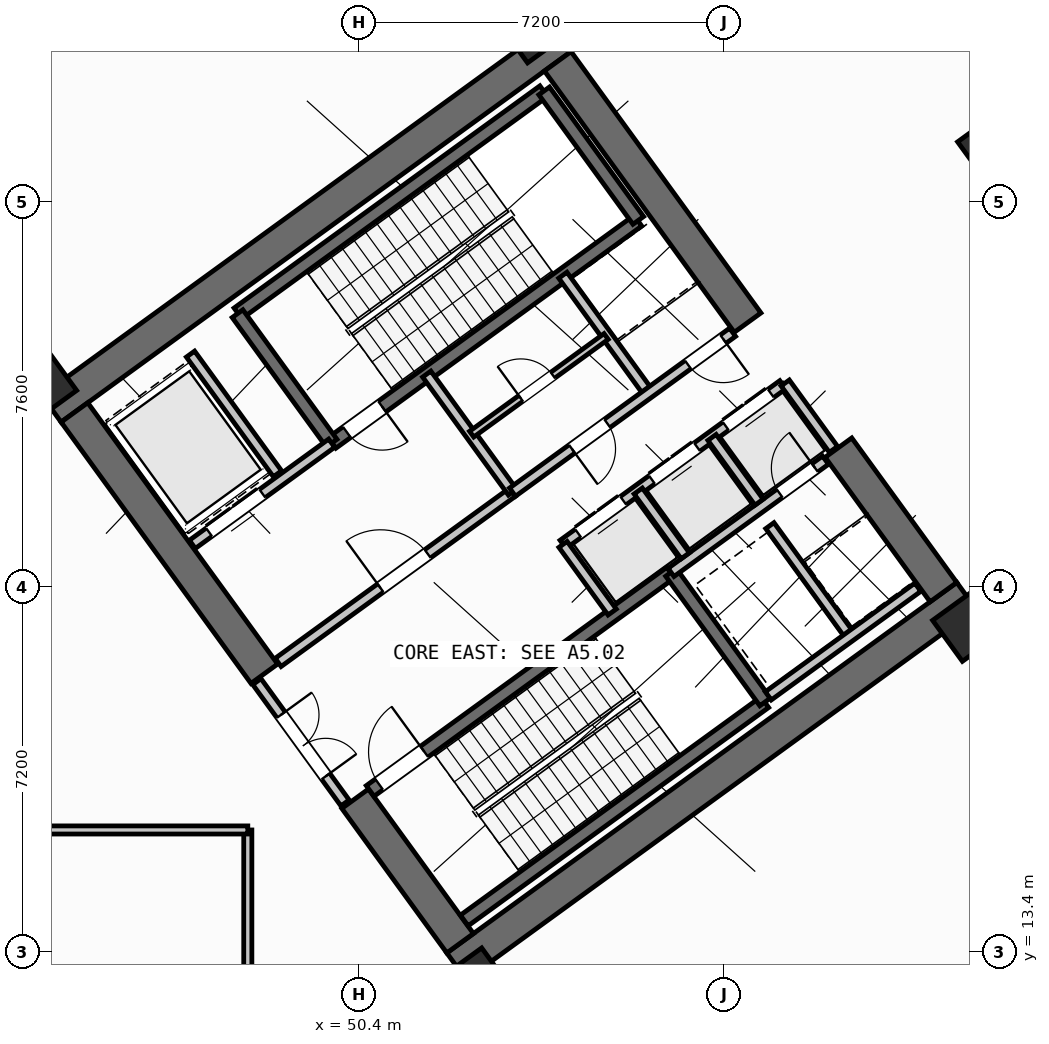
"""IFC4 building model, lengths in metres.
Left out: names, types, materials, properties, quantities, classifications, styles, units other than length and angle.
Written with IfcOpenShell. Run it as: python <this file> out.ifc"""

import sys

from ifc_helpers import new_model, si_unit, direction, frame, frame_2d, origin, origin_2d, place, context, subcontext, project, spatial, rectangle, hollow_rectangle, extrude, source, transform, mapped, element, fill, save


model = new_model("IFC4")
c1 = context("Model", 3, precision=1e-05, world=origin(), true_north=direction((0.0, 1.0)))
c2 = subcontext(c1, "Body", "Model", "MODEL_VIEW")
j1 = project(units=[si_unit("LENGTHUNIT", "METRE"), si_unit("PLANEANGLEUNIT", "RADIAN")], contexts=[c1])
p1 = place(None, origin())
s1 = spatial("IfcSite", under=j1, at=p1, CompositionType="ELEMENT")
p2 = place(p1, origin())
s2 = spatial("IfcBuilding", under=s1, at=p2, CompositionType="ELEMENT")
p3 = place(p2, frame((0.0, 0.0, 18.6)))
s3 = spatial("IfcBuildingStorey", under=s2, at=p3, CompositionType="ELEMENT", Elevation=18.6)
p4 = place(p3, frame((52.318, 13.11, 0.0), z_axis=(0.0, 0.0, 1.0), x_axis=(0.809019445368, 0.587781878776, 0.0)))
e1 = element("IfcWall", 1, at=p4, inside=s3, PredefinedType="SHEAR", context=c2, shape_type="SweptSolid", body=[
    extrude(rectangle(XDim=12.44, YDim=0.65, at=frame_2d((6.22, 0.0))), origin(), (0.0, 0.0, 1.0), 4.95),
])
p5 = place(p3, frame((44.325, 24.113, 0.0), z_axis=(0.0, 0.0, 1.0), x_axis=(0.809012664862, 0.58779121131, 0.0)))
e2 = element("IfcWall", 2, at=p5, inside=s3, PredefinedType="SHEAR", context=c2, shape_type="SweptSolid", body=[
    extrude(rectangle(XDim=12.44, YDim=0.65, at=frame_2d((6.22, 0.0))), origin(), (0.0, 0.0, 1.0), 4.95),
])
p6 = place(p3, frame((52.39, 13.564, 0.0), z_axis=(0.0, 0.0, 1.0), x_axis=(-0.58779688989, 0.809008539037, 0.0)))
e3 = element("IfcWall", 3, at=p6, inside=s3, PredefinedType="SHEAR", context=c2, shape_type="SweptSolid", body=[
    extrude(rectangle(XDim=3.525, YDim=0.65, at=frame_2d((1.763, 0.0))), origin(), (0.0, 0.0, 1.0), 4.95),
])
p7 = place(p3, frame((48.526, 18.884, 0.0), z_axis=(0.0, 0.0, 1.0), x_axis=(-0.58777996584, 0.809020835181, 0.0)))
e4 = element("IfcWall", 4, at=p7, inside=s3, PredefinedType="SHEAR", context=c2, shape_type="SweptSolid", body=[
    extrude(rectangle(XDim=6.375, YDim=0.65, at=frame_2d((3.188, 0.0))), origin(), (0.0, 0.0, 1.0), 4.95),
])
p8 = place(p3, frame((61.929, 20.494, 0.0), z_axis=(0.0, 0.0, 1.0), x_axis=(-0.58782982593, 0.808984607855, 0.0)))
e5 = element("IfcWall", 5, at=p8, inside=s3, PredefinedType="SHEAR", context=c2, shape_type="SweptSolid", body=[
    extrude(rectangle(XDim=3.525, YDim=0.65, at=frame_2d((1.762, 0.0))), origin(), (0.0, 0.0, 1.0), 4.95),
])
p9 = place(p3, frame((58.064, 25.813, 0.0), z_axis=(0.0, 0.0, 1.0), x_axis=(-0.58777996584, 0.809020835181, 0.0)))
e6 = element("IfcWall", 6, at=p9, inside=s3, PredefinedType="SHEAR", context=c2, shape_type="SweptSolid", body=[
    extrude(rectangle(XDim=6.375, YDim=0.65, at=frame_2d((3.188, 0.0))), origin(), (0.0, 0.0, 1.0), 4.95),
])
m1 = source(origin(), c2, "Body", "SweptSolid", [
    extrude(hollow_rectangle(XDim=1.1, YDim=1.1, WallThickness=0.04, at=origin_2d()), origin(), (0.0, 0.0, 1.0), 5.4),
])
p10 = place(p3, frame((62.977, 29.259, 0.0), z_axis=(0.0, 0.0, 1.0), x_axis=(0.809016994375, 0.587785252292, 0.0)))
e7 = element("IfcColumn", 7, at=p10, inside=s3, PredefinedType="COLUMN", context=c2, shape_type="MappedRepresentation", body=[
    mapped(m1, transform((0.0, 0.0, 0.0), scale=1.0)),
])
m2 = source(origin(), c2, "Body", "SweptSolid", [
    extrude(hollow_rectangle(XDim=1.0, YDim=1.0, WallThickness=0.04, at=origin_2d()), origin(), (0.0, 0.0, 1.0), 5.4),
])
for number, where, z_axis, x_axis in (
    (8, (52.705, 12.773, 0.0), (0.0, 0.0, 1.0), (0.809, 0.588, 0.0)),
    (9, (44.124, 24.585, 0.0), (0.0, 0.0, 1.0), (0.809, 0.588, 0.0)),
    (10, (62.414, 19.827, 0.0), (0.0, 0.0, 1.0), (0.809, 0.588, 0.0)),
    (11, (53.832, 31.638, 0.0), (0.0, 0.0, 1.0), (0.809, 0.588, 0.0)),
):
    element("IfcColumn", number, at=place(p3, frame(where, z_axis=z_axis, x_axis=x_axis)), inside=s3, PredefinedType="COLUMN", context=c2, shape_type="MappedRepresentation", body=[
        mapped(m2, transform((0.0, 0.0, 0.0), scale=1.0)),
    ])
p11 = place(p3, frame((48.006, 25.996, 0.0), z_axis=(0.0, 0.0, 1.0), x_axis=(0.80901903764, 0.587782439969, 0.0)))
e12 = element("IfcWall", 12, at=p11, inside=s3, PredefinedType="SHEAR", context=c2, shape_type="SweptSolid", body=[
    extrude(rectangle(XDim=7.46, YDim=0.26, at=frame_2d((3.73, 0.0))), origin(), (0.0, 0.0, 1.0), 4.95),
])
p12 = place(p3, frame((49.863, 23.44, 0.0), z_axis=(0.0, 0.0, 1.0), x_axis=(0.809003474932, 0.587803859759, 0.0)))
e13 = element("IfcWall", 13, at=p12, inside=s3, PredefinedType="SHEAR", context=c2, shape_type="SweptSolid", body=[
    extrude(rectangle(XDim=7.46, YDim=0.26, at=frame_2d((3.73, 0.0))), origin(), (0.0, 0.0, 1.0), 4.95),
])
p13 = place(p12, frame((0.36, 0.0, 0.0)))
e14 = element("IfcOpeningElement", 14, at=p13, cuts=e13, PredefinedType="OPENING", context=c2, shape_type="SweptSolid", body=[
    extrude(rectangle(XDim=0.86, YDim=2.05, at=frame_2d((0.43, 1.025))), frame((0.0, 0.14, 0.0), z_axis=(0.0, -1.0, 0.0), x_axis=(1.0, 0.0, 0.0)), (0.0, 0.0, 1.0), 0.28),
])
p14 = place(p3, frame((49.855, 23.434, 0.0), z_axis=(0.0, 0.0, 1.0), x_axis=(-0.58776738483, 0.809029975545, 0.0)))
e15 = element("IfcWall", 15, at=p14, inside=s3, PredefinedType="SHEAR", context=c2, shape_type="SweptSolid", body=[
    extrude(rectangle(XDim=3.16, YDim=0.26, at=frame_2d((1.58, 0.0))), origin(), (0.0, 0.0, 1.0), 4.95),
])
p15 = place(p3, frame((55.906, 27.831, 0.0), z_axis=(0.0, 0.0, 1.0), x_axis=(-0.587804123638, 0.809003283204, 0.0)))
e16 = element("IfcWall", 16, at=p15, inside=s3, PredefinedType="SHEAR", context=c2, shape_type="SweptSolid", body=[
    extrude(rectangle(XDim=3.16, YDim=0.26, at=frame_2d((1.58, 0.0))), origin(), (0.0, 0.0, 1.0), 4.95),
])
p16 = place(p3, frame((52.472, 14.013, 0.0), z_axis=(0.0, 0.0, 1.0), x_axis=(0.809028366311, 0.587769599847, 0.0)))
e17 = element("IfcWall", 17, at=p16, inside=s3, PredefinedType="SHEAR", context=c2, shape_type="SweptSolid", body=[
    extrude(rectangle(XDim=7.33, YDim=0.26, at=frame_2d((3.665, 0.0))), origin(), (0.0, 0.0, 1.0), 4.95),
])
p17 = place(p3, frame((50.615, 16.57, 0.0), z_axis=(0.0, 0.0, 1.0), x_axis=(0.809028366311, 0.587769599847, 0.0)))
e18 = element("IfcWall", 18, at=p17, inside=s3, PredefinedType="SHEAR", context=c2, shape_type="SweptSolid", body=[
    extrude(rectangle(XDim=7.33, YDim=0.26, at=frame_2d((3.665, 0.0))), origin(), (0.0, 0.0, 1.0), 4.95),
])
p18 = place(p17, frame((0.22, 0.0, 0.0)))
e19 = element("IfcOpeningElement", 19, at=p18, cuts=e18, PredefinedType="OPENING", context=c2, shape_type="SweptSolid", body=[
    extrude(rectangle(XDim=1.1, YDim=2.1, at=frame_2d((0.55, 1.05))), frame((0.0, 0.14, 0.0), z_axis=(0.0, -1.0, 0.0), x_axis=(1.0, 0.0, 0.0)), (0.0, 0.0, 1.0), 0.28),
])
p19 = place(p3, frame((58.41, 18.327, 0.0), z_axis=(0.0, 0.0, 1.0), x_axis=(-0.58776738483, 0.809029975545, 0.0)))
e20 = element("IfcWall", 20, at=p19, inside=s3, PredefinedType="SHEAR", context=c2, shape_type="SweptSolid", body=[
    extrude(rectangle(XDim=3.16, YDim=0.26, at=frame_2d((1.58, 0.0))), origin(), (0.0, 0.0, 1.0), 4.95),
])
p20 = place(p3, frame((47.106, 21.437, 0.0), z_axis=(0.0, 0.0, 1.0), x_axis=(0.809012514015, 0.58779141893, 0.0)))
e21 = element("IfcWall", 21, at=p20, inside=s3, PredefinedType="STANDARD", context=c2, shape_type="SweptSolid", body=[
    extrude(rectangle(XDim=3.398, YDim=0.2, at=frame_2d((1.699, 0.0))), origin(), (0.0, 0.0, 1.0), 4.94),
])
p21 = place(p20, frame((0.408, 0.0, 0.0)))
e22 = element("IfcOpeningElement", 22, at=p21, cuts=e21, PredefinedType="OPENING", context=c2, shape_type="SweptSolid", body=[
    extrude(rectangle(XDim=1.3, YDim=2.2, at=frame_2d((0.65, 1.1))), frame((0.0, 0.11, 0.0), z_axis=(0.0, -1.0, 0.0), x_axis=(1.0, 0.0, 0.0)), (0.0, 0.0, 1.0), 0.22),
])
p22 = place(p3, frame((48.799, 19.107, 0.0), z_axis=(0.0, 0.0, 1.0), x_axis=(0.809012959416, 0.587790805897, 0.0)))
e23 = element("IfcWall", 23, at=p22, inside=s3, PredefinedType="STANDARD", context=c2, shape_type="SweptSolid", body=[
    extrude(rectangle(XDim=5.718, YDim=0.2, at=frame_2d((2.859, 0.0))), origin(), (0.0, 0.0, 1.0), 4.94),
])
p23 = place(p22, frame((2.498, 0.0, 0.0)))
e24 = element("IfcOpeningElement", 24, at=p23, cuts=e23, PredefinedType="OPENING", context=c2, shape_type="SweptSolid", body=[
    extrude(rectangle(XDim=1.15, YDim=2.1, at=frame_2d((0.575, 1.05))), frame((0.0, 0.11, 0.0), z_axis=(0.0, -1.0, 0.0), x_axis=(1.0, 0.0, 0.0)), (0.0, 0.0, 1.0), 0.22),
])
p24 = place(p3, frame((56.553, 20.884, 0.0), z_axis=(0.0, 0.0, 1.0), x_axis=(0.809035789462, 0.587759382205, 0.0)))
e25 = element("IfcWall", 25, at=p24, inside=s3, PredefinedType="STANDARD", context=c2, shape_type="SweptSolid", body=[
    extrude(rectangle(XDim=3.768, YDim=0.2, at=frame_2d((1.884, 0.0))), origin(), (0.0, 0.0, 1.0), 4.94),
])
p25 = place(p24, frame((2.65, 0.0, 0.0)))
e26 = element("IfcOpeningElement", 26, at=p25, cuts=e25, PredefinedType="OPENING", context=c2, shape_type="SweptSolid", body=[
    extrude(rectangle(XDim=0.86, YDim=2.05, at=frame_2d((0.43, 1.025))), frame((0.0, 0.11, 0.0), z_axis=(0.0, -1.0, 0.0), x_axis=(1.0, 0.0, 0.0)), (0.0, 0.0, 1.0), 0.22),
])
p26 = place(p3, frame((54.421, 21.436, 0.0), z_axis=(0.0, 0.0, 1.0), x_axis=(0.809013710463, 0.587789772183, 0.0)))
e27 = element("IfcWall", 27, at=p26, inside=s3, PredefinedType="STANDARD", context=c2, shape_type="SweptSolid", body=[
    extrude(rectangle(XDim=5.36, YDim=0.2, at=frame_2d((2.68, 0.0))), origin(), (0.0, 0.0, 1.0), 4.94),
])
p27 = place(p26, frame((0.37, 0.0, 0.0)))
e28 = element("IfcOpeningElement", 28, at=p27, cuts=e27, PredefinedType="OPENING", context=c2, shape_type="SweptSolid", body=[
    extrude(rectangle(XDim=1.1, YDim=2.15, at=frame_2d((0.55, 1.075))), frame((0.0, 0.11, 0.0), z_axis=(0.0, -1.0, 0.0), x_axis=(1.0, 0.0, 0.0)), (0.0, 0.0, 1.0), 0.22),
])
p28 = place(p26, frame((2.17, 0.0, 0.0)))
e29 = element("IfcOpeningElement", 29, at=p28, cuts=e27, PredefinedType="OPENING", context=c2, shape_type="SweptSolid", body=[
    extrude(rectangle(XDim=1.1, YDim=2.15, at=frame_2d((0.55, 1.075))), frame((0.0, 0.11, 0.0), z_axis=(0.0, -1.0, 0.0), x_axis=(1.0, 0.0, 0.0)), (0.0, 0.0, 1.0), 0.22),
])
p29 = place(p26, frame((3.97, 0.0, 0.0)))
e30 = element("IfcOpeningElement", 30, at=p29, cuts=e27, PredefinedType="OPENING", context=c2, shape_type="SweptSolid", body=[
    extrude(rectangle(XDim=1.1, YDim=2.15, at=frame_2d((0.55, 1.075))), frame((0.0, 0.11, 0.0), z_axis=(0.0, -1.0, 0.0), x_axis=(1.0, 0.0, 0.0)), (0.0, 0.0, 1.0), 0.22),
])
p30 = place(p3, frame((55.391, 20.102, 0.0), z_axis=(0.0, 0.0, 1.0), x_axis=(-0.58778447739, 0.809017557374, 0.0)))
e31 = element("IfcWall", 31, at=p30, inside=s3, PredefinedType="STANDARD", context=c2, shape_type="SweptSolid", body=[
    extrude(rectangle(XDim=1.65, YDim=0.2, at=frame_2d((0.825, 0.0))), origin(), (0.0, 0.0, 1.0), 4.94),
])
p31 = place(p3, frame((48.786, 22.83, 0.0), z_axis=(0.0, 0.0, 1.0), x_axis=(-0.587783856777, 0.809018008275, 0.0)))
e32 = element("IfcWall", 32, at=p31, inside=s3, PredefinedType="STANDARD", context=c2, shape_type="SweptSolid", body=[
    extrude(rectangle(XDim=2.92, YDim=0.2, at=frame_2d((1.46, 0.0))), origin(), (0.0, 0.0, 1.0), 4.94),
])
p32 = place(p3, frame((56.834, 21.212, 0.0), z_axis=(0.0, 0.0, 1.0), x_axis=(-0.58776738483, 0.809029975545, 0.0)))
e33 = element("IfcWall", 33, at=p32, inside=s3, PredefinedType="STANDARD", context=c2, shape_type="SweptSolid", body=[
    extrude(rectangle(XDim=1.58, YDim=0.2, at=frame_2d((0.79, 0.0))), origin(), (0.0, 0.0, 1.0), 4.94),
])
p33 = place(p3, frame((58.29, 22.27, 0.0), z_axis=(0.0, 0.0, 1.0), x_axis=(-0.587840865826, 0.808976585857, 0.0)))
e34 = element("IfcWall", 34, at=p33, inside=s3, PredefinedType="STANDARD", context=c2, shape_type="SweptSolid", body=[
    extrude(rectangle(XDim=1.58, YDim=0.2, at=frame_2d((0.79, 0.0))), origin(), (0.0, 0.0, 1.0), 4.94),
])
p34 = place(p3, frame((59.758, 23.312, 0.0), z_axis=(0.0, 0.0, 1.0), x_axis=(-0.587875962906, 0.808951081486, 0.0)))
e35 = element("IfcWall", 35, at=p34, inside=s3, PredefinedType="STANDARD", context=c2, shape_type="SweptSolid", body=[
    extrude(rectangle(XDim=1.62, YDim=0.2, at=frame_2d((0.81, 0.0))), origin(), (0.0, 0.0, 1.0), 3.125),
])
p35 = place(p3, frame((60.067, 19.655, 0.0), z_axis=(0.0, 0.0, 1.0), x_axis=(-0.587800520745, 0.809005900975, 0.0)))
e36 = element("IfcWall", 36, at=p35, inside=s3, PredefinedType="STANDARD", context=c2, shape_type="SweptSolid", body=[
    extrude(rectangle(XDim=2.66, YDim=0.2, at=frame_2d((1.33, 0.0))), origin(), (0.0, 0.0, 1.0), 4.94),
])
p36 = place(p3, frame((58.472, 18.447, 0.0), z_axis=(0.0, 0.0, 1.0), x_axis=(0.809022487728, 0.587777691266, 0.0)))
e37 = element("IfcWall", 37, at=p36, inside=s3, PredefinedType="STANDARD", context=c2, shape_type="SweptSolid", body=[
    extrude(rectangle(XDim=3.648, YDim=0.2, at=frame_2d((1.824, 0.0))), origin(), (0.0, 0.0, 1.0), 4.94),
])
p37 = place(p3, frame((53.425, 22.468, 0.0), z_axis=(0.0, 0.0, 1.0), x_axis=(-0.5877230039, 0.809062216821, 0.0)))
e38 = element("IfcWall", 38, at=p37, inside=s3, PredefinedType="STANDARD", context=c2, shape_type="SweptSolid", body=[
    extrude(rectangle(XDim=2.88, YDim=0.2, at=frame_2d((1.44, 0.0))), origin(), (0.0, 0.0, 1.0), 4.94),
])
p38 = place(p3, frame((56.111, 24.419, 0.0), z_axis=(0.0, 0.0, 1.0), x_axis=(-0.58777848983, 0.809021907548, 0.0)))
e39 = element("IfcWall", 39, at=p38, inside=s3, PredefinedType="STANDARD", context=c2, shape_type="SweptSolid", body=[
    extrude(rectangle(XDim=2.88, YDim=0.2, at=frame_2d((1.44, 0.0))), origin(), (0.0, 0.0, 1.0), 4.94),
])
p39 = place(p3, frame((53.425, 22.468, 0.0), z_axis=(0.0, 0.0, 1.0), x_axis=(0.80902705128, 0.587771409902, 0.0)))
e40 = element("IfcWall", 40, at=p39, inside=s3, PredefinedType="STANDARD", context=c2, shape_type="SweptSolid", body=[
    extrude(rectangle(XDim=5.368, YDim=0.2, at=frame_2d((2.684, 0.0))), origin(), (0.0, 0.0, 1.0), 4.94),
])
p40 = place(p39, frame((4.28, 0.0, 0.0)))
e41 = element("IfcOpeningElement", 41, at=p40, cuts=e40, PredefinedType="OPENING", context=c2, shape_type="SweptSolid", body=[
    extrude(rectangle(XDim=0.86, YDim=2.05, at=frame_2d((0.43, 1.025))), frame((0.0, 0.11, 0.0), z_axis=(0.0, -1.0, 0.0), x_axis=(1.0, 0.0, 0.0)), (0.0, 0.0, 1.0), 0.22),
])
p41 = place(p39, frame((1.45, 0.0, 0.0)))
e42 = element("IfcOpeningElement", 42, at=p41, cuts=e40, PredefinedType="OPENING", context=c2, shape_type="SweptSolid", body=[
    extrude(rectangle(XDim=0.86, YDim=2.05, at=frame_2d((0.43, 1.025))), frame((0.0, 0.11, 0.0), z_axis=(0.0, -1.0, 0.0), x_axis=(1.0, 0.0, 0.0)), (0.0, 0.0, 1.0), 0.22),
])
p42 = place(p3, frame((52.618, 23.612, 0.0), z_axis=(0.0, 0.0, 1.0), x_axis=(0.809009587469, 0.587795446889, 0.0)))
e43 = element("IfcWall", 43, at=p42, inside=s3, PredefinedType="PLUMBINGWALL", context=c2, shape_type="SweptSolid", body=[
    extrude(rectangle(XDim=3.28, YDim=0.14, at=frame_2d((1.64, 0.0))), origin(), (0.0, 0.0, 1.0), 4.94),
])
p43 = place(p42, frame((1.2, 0.0, 0.0)))
e44 = element("IfcOpeningElement", 44, at=p43, cuts=e43, PredefinedType="OPENING", context=c2, shape_type="SweptSolid", body=[
    extrude(rectangle(XDim=0.78, YDim=2.05, at=frame_2d((0.39, 1.025))), frame((0.0, 0.08, 0.0), z_axis=(0.0, -1.0, 0.0), x_axis=(1.0, 0.0, 0.0)), (0.0, 0.0, 1.0), 0.16),
])
p44 = place(p3, frame((50.119, 16.333, 0.0), z_axis=(0.0, 0.0, 1.0), x_axis=(-0.587749856981, 0.809042709391, 0.0)))
e45 = element("IfcWall", 45, at=p44, inside=s3, PredefinedType="STANDARD", context=c2, shape_type="SweptSolid", body=[
    extrude(rectangle(XDim=2.96, YDim=0.2, at=frame_2d((1.48, 0.0))), origin(), (0.0, 0.0, 1.0), 3.125),
])
p45 = place(p44, frame((0.65, 0.0, 0.0)))
e46 = element("IfcOpeningElement", 46, at=p45, cuts=e45, PredefinedType="OPENING", context=c2, shape_type="SweptSolid", body=[
    extrude(rectangle(XDim=1.5, YDim=2.15, at=frame_2d((0.75, 1.075))), frame((0.0, 0.11, 0.0), z_axis=(0.0, -1.0, 0.0), x_axis=(1.0, 0.0, 0.0)), (0.0, 0.0, 1.0), 0.22),
])
p46 = place(p3, frame((48.2, 9.58, 0.0), z_axis=(0.0, 0.0, 1.0), x_axis=(0.0, 1.0, 0.0)))
e47 = element("IfcWall", 47, at=p46, inside=s3, PredefinedType="PARTITIONING", context=c2, shape_type="SweptSolid", body=[
    extrude(rectangle(XDim=6.22, YDim=0.16, at=frame_2d((3.11, 0.0))), origin(), (0.0, 0.0, 1.0), 4.94),
])
p47 = place(p3, frame((35.534, 15.8, 0.0), z_axis=(0.0, 0.0, 1.0), x_axis=(1.0, 0.0, 0.0)))
e48 = element("IfcWall", 48, at=p47, inside=s3, PredefinedType="PARTITIONING", context=c2, shape_type="SweptSolid", body=[
    extrude(rectangle(XDim=12.666, YDim=0.16, at=frame_2d((6.333, 0.0))), origin(), (0.0, 0.0, 1.0), 4.94),
])
m3 = source(origin(), c2, "Body", "SweptSolid", [
    extrude(rectangle(XDim=0.86, YDim=2.05, at=frame_2d((0.43, 1.025))), frame((0.0, 0.025, 0.0), z_axis=(0.0, -1.0, 0.0), x_axis=(1.0, 0.0, 0.0)), (0.0, 0.0, 1.0), 0.05),
])
p48 = place(p13, frame((0.86, 0.0, 0.0), z_axis=(0.0, 0.0, 1.0), x_axis=(-1.0, 0.0, 0.0)))
e49 = element("IfcDoor", 49, at=p48, inside=s3, OperationType="SINGLE_SWING_LEFT", PredefinedType="DOOR", context=c2, shape_type="MappedRepresentation", body=[
    mapped(m3, transform((0.0, 0.0, 0.0), scale=1.0)),
])
fill(e14, e49)
m4 = source(origin(), c2, "Body", "SweptSolid", [
    extrude(rectangle(XDim=1.1, YDim=2.1, at=frame_2d((0.55, 1.05))), frame((0.0, 0.025, 0.0), z_axis=(0.0, -1.0, 0.0), x_axis=(1.0, 0.0, 0.0)), (0.0, 0.0, 1.0), 0.05),
])
p49 = place(p18, origin())
e50 = element("IfcDoor", 50, at=p49, inside=s3, OperationType="SINGLE_SWING_RIGHT", PredefinedType="DOOR", context=c2, shape_type="MappedRepresentation", body=[
    mapped(m4, transform((0.0, 0.0, 0.0), scale=1.0)),
])
fill(e19, e50)
m5 = source(origin(), c2, "Body", "SweptSolid", [
    extrude(rectangle(XDim=1.15, YDim=2.1, at=frame_2d((0.575, 1.05))), frame((0.0, 0.025, 0.0), z_axis=(0.0, -1.0, 0.0), x_axis=(1.0, 0.0, 0.0)), (0.0, 0.0, 1.0), 0.05),
])
p50 = place(p23, origin())
e51 = element("IfcDoor", 51, at=p50, inside=s3, OperationType="SINGLE_SWING_LEFT", PredefinedType="DOOR", context=c2, shape_type="MappedRepresentation", body=[
    mapped(m5, transform((0.0, 0.0, 0.0), scale=1.0)),
])
fill(e24, e51)
m6 = source(origin(), c2, "Body", "SweptSolid", [
    extrude(rectangle(XDim=1.3, YDim=2.2, at=frame_2d((0.65, 1.1))), frame((0.0, 0.025, 0.0), z_axis=(0.0, -1.0, 0.0), x_axis=(1.0, 0.0, 0.0)), (0.0, 0.0, 1.0), 0.05),
])
p51 = place(p21, origin())
e52 = element("IfcDoor", 52, at=p51, inside=s3, OperationType="DOUBLE_DOOR_SLIDING", PredefinedType="DOOR", context=c2, shape_type="MappedRepresentation", body=[
    mapped(m6, transform((0.0, 0.0, 0.0), scale=1.0)),
])
fill(e22, e52)
m7 = source(origin(), c2, "Body", "SweptSolid", [
    extrude(rectangle(XDim=1.1, YDim=2.15, at=frame_2d((0.55, 1.075))), frame((0.0, 0.025, 0.0), z_axis=(0.0, -1.0, 0.0), x_axis=(1.0, 0.0, 0.0)), (0.0, 0.0, 1.0), 0.05),
])
p52 = place(p27, origin())
e53 = element("IfcDoor", 53, at=p52, inside=s3, OperationType="DOUBLE_DOOR_SLIDING", PredefinedType="DOOR", context=c2, shape_type="MappedRepresentation", body=[
    mapped(m7, transform((0.0, 0.0, 0.0), scale=1.0)),
])
fill(e28, e53)
p53 = place(p28, origin())
e54 = element("IfcDoor", 54, at=p53, inside=s3, OperationType="DOUBLE_DOOR_SLIDING", PredefinedType="DOOR", context=c2, shape_type="MappedRepresentation", body=[
    mapped(m7, transform((0.0, 0.0, 0.0), scale=1.0)),
])
fill(e29, e54)
p54 = place(p29, origin())
e55 = element("IfcDoor", 55, at=p54, inside=s3, OperationType="DOUBLE_DOOR_SLIDING", PredefinedType="DOOR", context=c2, shape_type="MappedRepresentation", body=[
    mapped(m7, transform((0.0, 0.0, 0.0), scale=1.0)),
])
fill(e30, e55)
p55 = place(p25, origin())
e56 = element("IfcDoor", 56, at=p55, inside=s3, OperationType="SINGLE_SWING_RIGHT", PredefinedType="DOOR", context=c2, shape_type="MappedRepresentation", body=[
    mapped(m3, transform((0.0, 0.0, 0.0), scale=1.0)),
])
fill(e26, e56)
p56 = place(p40, frame((0.86, 0.0, 0.0), z_axis=(0.0, 0.0, 1.0), x_axis=(-1.0, 0.0, 0.0)))
e57 = element("IfcDoor", 57, at=p56, inside=s3, OperationType="SINGLE_SWING_LEFT", PredefinedType="DOOR", context=c2, shape_type="MappedRepresentation", body=[
    mapped(m3, transform((0.0, 0.0, 0.0), scale=1.0)),
])
fill(e41, e57)
p57 = place(p41, frame((0.86, 0.0, 0.0), z_axis=(0.0, 0.0, 1.0), x_axis=(-1.0, 0.0, 0.0)))
e58 = element("IfcDoor", 58, at=p57, inside=s3, OperationType="SINGLE_SWING_RIGHT", PredefinedType="DOOR", context=c2, shape_type="MappedRepresentation", body=[
    mapped(m3, transform((0.0, 0.0, 0.0), scale=1.0)),
])
fill(e42, e58)
m8 = source(origin(), c2, "Body", "SweptSolid", [
    extrude(rectangle(XDim=0.78, YDim=2.05, at=frame_2d((0.39, 1.025))), frame((0.0, 0.025, 0.0), z_axis=(0.0, -1.0, 0.0), x_axis=(1.0, 0.0, 0.0)), (0.0, 0.0, 1.0), 0.05),
])
p58 = place(p43, origin())
e59 = element("IfcDoor", 59, at=p58, inside=s3, OperationType="SINGLE_SWING_LEFT", PredefinedType="DOOR", context=c2, shape_type="MappedRepresentation", body=[
    mapped(m8, transform((0.0, 0.0, 0.0), scale=1.0)),
])
fill(e44, e59)
m9 = source(origin(), c2, "Body", "SweptSolid", [
    extrude(rectangle(XDim=1.5, YDim=2.15, at=frame_2d((0.75, 1.075))), frame((0.0, 0.025, 0.0), z_axis=(0.0, -1.0, 0.0), x_axis=(1.0, 0.0, 0.0)), (0.0, 0.0, 1.0), 0.05),
])
p59 = place(p45, frame((1.5, 0.0, 0.0), z_axis=(0.0, 0.0, 1.0), x_axis=(-1.0, 0.0, 0.0)))
e60 = element("IfcDoor", 60, at=p59, inside=s3, OperationType="DOUBLE_DOOR_SINGLE_SWING", PredefinedType="DOOR", context=c2, shape_type="MappedRepresentation", body=[
    mapped(m9, transform((0.0, 0.0, 0.0), scale=1.0)),
])
fill(e46, e60)
save(model, sys.argv[1])
